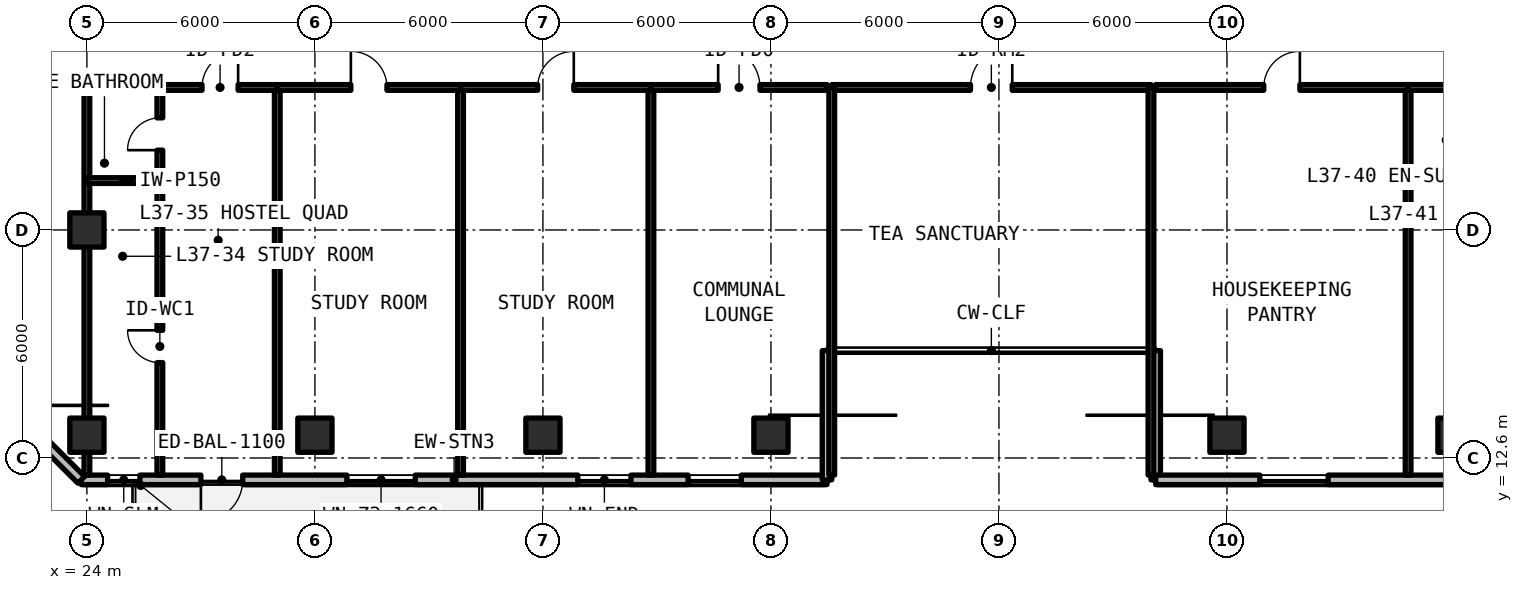
"""IFC4 building model, lengths in metres.
Left out: names, types, materials, properties, quantities, classifications, styles, units other than length and angle.
Written with IfcOpenShell. Run it as: python <this file> out.ifc"""

import sys

from ifc_helpers import new_model, si_unit, direction, frame, frame_2d, origin, origin_2d, place, context, subcontext, project, spatial, rectangle, extrude, element, fill, save


model = new_model("IFC4")
c1 = context("Model", 3, precision=1e-05, world=origin(), true_north=direction((0.0, 1.0)))
c2 = subcontext(c1, "Body", "Model", "MODEL_VIEW")
j1 = project(units=[si_unit("LENGTHUNIT", "METRE"), si_unit("PLANEANGLEUNIT", "RADIAN")], contexts=[c1])
p1 = place(None, origin())
s1 = spatial("IfcSite", under=j1, at=p1, CompositionType="ELEMENT")
p2 = place(p1, origin())
s2 = spatial("IfcBuilding", under=s1, at=p2, CompositionType="ELEMENT")
p3 = place(p2, frame((0.0, 0.0, 135.3)))
s3 = spatial("IfcBuildingStorey", under=s2, at=p3, CompositionType="ELEMENT", Elevation=135.3)
for number, where, z_axis, x_axis in (
    (1, (24.0, 18.6, 0.0), (0.0, 0.0, 1.0), (1.0, 0.0, 0.0)),
    (2, (24.0, 13.2, 0.0), (0.0, 0.0, 1.0), (1.0, 0.0, 0.0)),
    (3, (30.0, 13.2, 0.0), (0.0, 0.0, 1.0), (1.0, 0.0, 0.0)),
    (4, (36.0, 13.2, 0.0), (0.0, 0.0, 1.0), (1.0, 0.0, 0.0)),
    (5, (42.0, 13.2, 0.0), (0.0, 0.0, 1.0), (1.0, 0.0, 0.0)),
    (6, (54.0, 13.2, 0.0), (0.0, 0.0, 1.0), (1.0, 0.0, 0.0)),
    (7, (60.0, 13.2, 0.0), (0.0, 0.0, 1.0), (1.0, 0.0, 0.0)),
):
    element("IfcColumn", number, at=place(p3, frame(where, z_axis=z_axis, x_axis=x_axis)), inside=s3, PredefinedType="COLUMN", context=c2, shape_type="SweptSolid", body=[
        extrude(rectangle(XDim=0.9, YDim=0.9, at=origin_2d()), origin(), (0.0, 0.0, 1.0), 3.3),
    ])
p4 = place(p3, frame((23.852, 12.025, 0.0), z_axis=(0.0, 0.0, 1.0), x_axis=(1.0, 0.0, 0.0)))
e8 = element("IfcWall", 8, at=p4, inside=s3, PredefinedType="SOLIDWALL", context=c2, shape_type="SweptSolid", body=[
    extrude(rectangle(XDim=19.623, YDim=0.25, at=frame_2d((9.812, 0.0))), origin(), (0.0, 0.0, 1.0), 3.08),
])
p5 = place(p4, frame((3.148, 0.0, 0.0)))
e9 = element("IfcOpeningElement", 9, at=p5, cuts=e8, PredefinedType="OPENING", context=c2, shape_type="SweptSolid", body=[
    extrude(rectangle(XDim=1.1, YDim=2.15, at=frame_2d((0.55, 1.075))), frame((0.0, 0.135, 0.0), z_axis=(0.0, -1.0, 0.0), x_axis=(1.0, 0.0, 0.0)), (0.0, 0.0, 1.0), 0.27),
])
p6 = place(p4, frame((0.693, 0.0, 0.78)))
e10 = element("IfcOpeningElement", 10, at=p6, cuts=e8, PredefinedType="OPENING", context=c2, shape_type="SweptSolid", body=[
    extrude(rectangle(XDim=0.85, YDim=1.65, at=frame_2d((0.425, 0.825))), frame((0.0, 0.135, 0.0), z_axis=(0.0, -1.0, 0.0), x_axis=(1.0, 0.0, 0.0)), (0.0, 0.0, 1.0), 0.27),
])
p7 = place(p4, frame((6.989, 0.0, 0.78)))
e11 = element("IfcOpeningElement", 11, at=p7, cuts=e8, PredefinedType="OPENING", context=c2, shape_type="SweptSolid", body=[
    extrude(rectangle(XDim=1.8, YDim=1.66, at=frame_2d((0.9, 0.83))), frame((0.0, 0.135, 0.0), z_axis=(0.0, -1.0, 0.0), x_axis=(1.0, 0.0, 0.0)), (0.0, 0.0, 1.0), 0.27),
])
p8 = place(p4, frame((13.065, 0.0, 0.78)))
e12 = element("IfcOpeningElement", 12, at=p8, cuts=e8, PredefinedType="OPENING", context=c2, shape_type="SweptSolid", body=[
    extrude(rectangle(XDim=1.4, YDim=1.65, at=frame_2d((0.7, 0.825))), frame((0.0, 0.135, 0.0), z_axis=(0.0, -1.0, 0.0), x_axis=(1.0, 0.0, 0.0)), (0.0, 0.0, 1.0), 0.27),
])
p9 = place(p4, frame((15.969, 0.0, 0.78)))
e13 = element("IfcOpeningElement", 13, at=p9, cuts=e8, PredefinedType="OPENING", context=c2, shape_type="SweptSolid", body=[
    extrude(rectangle(XDim=1.4, YDim=1.65, at=frame_2d((0.7, 0.825))), frame((0.0, 0.135, 0.0), z_axis=(0.0, -1.0, 0.0), x_axis=(1.0, 0.0, 0.0)), (0.0, 0.0, 1.0), 0.27),
])
for number, where, z_axis, x_axis in (
    (14, (43.475, 12.025, 0.0), (0.0, 0.0, 1.0), (0.0, 1.0, 0.0)),
    (15, (52.125, 15.425, 0.0), (0.0, 0.0, 1.0), (0.0, -1.0, 0.0)),
):
    element("IfcWall", number, at=place(p3, frame(where, z_axis=z_axis, x_axis=x_axis)), inside=s3, PredefinedType="SOLIDWALL", context=c2, shape_type="SweptSolid", body=[
        extrude(rectangle(XDim=3.4, YDim=0.25, at=frame_2d((1.7, 0.0))), origin(), (0.0, 0.0, 1.0), 3.08),
    ])
p10 = place(p3, frame((52.125, 12.025, 0.0), z_axis=(0.0, 0.0, 1.0), x_axis=(1.0, 0.0, 0.0)))
e16 = element("IfcWall", 16, at=p10, inside=s3, PredefinedType="SOLIDWALL", context=c2, shape_type="SweptSolid", body=[
    extrude(rectangle(XDim=43.623, YDim=0.25, at=frame_2d((21.812, 0.0))), origin(), (0.0, 0.0, 1.0), 3.08),
])
p11 = place(p10, frame((10.925, 0.0, 0.0)))
e17 = element("IfcOpeningElement", 17, at=p11, cuts=e16, PredefinedType="OPENING", context=c2, shape_type="SweptSolid", body=[
    extrude(rectangle(XDim=1.1, YDim=2.15, at=frame_2d((0.55, 1.075))), frame((0.0, 0.135, 0.0), z_axis=(0.0, -1.0, 0.0), x_axis=(1.0, 0.0, 0.0)), (0.0, 0.0, 1.0), 0.27),
])
p12 = place(p10, frame((22.025, 0.0, 0.0)))
e18 = element("IfcOpeningElement", 18, at=p12, cuts=e16, PredefinedType="OPENING", context=c2, shape_type="SweptSolid", body=[
    extrude(rectangle(XDim=1.1, YDim=2.15, at=frame_2d((0.55, 1.075))), frame((0.0, 0.135, 0.0), z_axis=(0.0, -1.0, 0.0), x_axis=(1.0, 0.0, 0.0)), (0.0, 0.0, 1.0), 0.27),
])
p13 = place(p10, frame((2.738, 0.0, 0.78)))
e19 = element("IfcOpeningElement", 19, at=p13, cuts=e16, PredefinedType="OPENING", context=c2, shape_type="SweptSolid", body=[
    extrude(rectangle(XDim=1.8, YDim=1.66, at=frame_2d((0.9, 0.83))), frame((0.0, 0.135, 0.0), z_axis=(0.0, -1.0, 0.0), x_axis=(1.0, 0.0, 0.0)), (0.0, 0.0, 1.0), 0.27),
])
p14 = place(p10, frame((8.443, 0.0, 0.78)))
e20 = element("IfcOpeningElement", 20, at=p14, cuts=e16, PredefinedType="OPENING", context=c2, shape_type="SweptSolid", body=[
    extrude(rectangle(XDim=0.85, YDim=1.65, at=frame_2d((0.425, 0.825))), frame((0.0, 0.135, 0.0), z_axis=(0.0, -1.0, 0.0), x_axis=(1.0, 0.0, 0.0)), (0.0, 0.0, 1.0), 0.27),
])
p15 = place(p10, frame((14.879, 0.0, 0.78)))
e21 = element("IfcOpeningElement", 21, at=p15, cuts=e16, PredefinedType="OPENING", context=c2, shape_type="SweptSolid", body=[
    extrude(rectangle(XDim=0.85, YDim=1.65, at=frame_2d((0.425, 0.825))), frame((0.0, 0.135, 0.0), z_axis=(0.0, -1.0, 0.0), x_axis=(1.0, 0.0, 0.0)), (0.0, 0.0, 1.0), 0.27),
])
p16 = place(p10, frame((17.184, 0.0, 0.78)))
e22 = element("IfcOpeningElement", 22, at=p16, cuts=e16, PredefinedType="OPENING", context=c2, shape_type="SweptSolid", body=[
    extrude(rectangle(XDim=1.8, YDim=1.66, at=frame_2d((0.9, 0.83))), frame((0.0, 0.135, 0.0), z_axis=(0.0, -1.0, 0.0), x_axis=(1.0, 0.0, 0.0)), (0.0, 0.0, 1.0), 0.27),
])
p17 = place(p10, frame((26.643, 0.0, 0.78)))
e23 = element("IfcOpeningElement", 23, at=p17, cuts=e16, PredefinedType="OPENING", context=c2, shape_type="SweptSolid", body=[
    extrude(rectangle(XDim=1.4, YDim=1.65, at=frame_2d((0.7, 0.825))), frame((0.0, 0.135, 0.0), z_axis=(0.0, -1.0, 0.0), x_axis=(1.0, 0.0, 0.0)), (0.0, 0.0, 1.0), 0.27),
])
p18 = place(p10, frame((32.777, 0.0, 0.78)))
e24 = element("IfcOpeningElement", 24, at=p18, cuts=e16, PredefinedType="OPENING", context=c2, shape_type="SweptSolid", body=[
    extrude(rectangle(XDim=1.8, YDim=1.66, at=frame_2d((0.9, 0.83))), frame((0.0, 0.135, 0.0), z_axis=(0.0, -1.0, 0.0), x_axis=(1.0, 0.0, 0.0)), (0.0, 0.0, 1.0), 0.27),
])
p19 = place(p10, frame((38.836, 0.0, 0.78)))
e25 = element("IfcOpeningElement", 25, at=p19, cuts=e16, PredefinedType="OPENING", context=c2, shape_type="SweptSolid", body=[
    extrude(rectangle(XDim=1.8, YDim=1.66, at=frame_2d((0.9, 0.83))), frame((0.0, 0.135, 0.0), z_axis=(0.0, -1.0, 0.0), x_axis=(1.0, 0.0, 0.0)), (0.0, 0.0, 1.0), 0.27),
])
p20 = place(p3, frame((19.725, 16.152, 0.0), z_axis=(0.0, 0.0, 1.0), x_axis=(0.70708586489, -0.707127696864, 0.0)))
e26 = element("IfcWall", 26, at=p20, inside=s3, PredefinedType="SOLIDWALL", context=c2, shape_type="SweptSolid", body=[
    extrude(rectangle(XDim=5.836, YDim=0.25, at=frame_2d((2.918, 0.0))), origin(), (0.0, 0.0, 1.0), 3.08),
])
p21 = place(p20, frame((0.898, 0.0, 0.78)))
e27 = element("IfcOpeningElement", 27, at=p21, cuts=e26, PredefinedType="OPENING", context=c2, shape_type="SweptSolid", body=[
    extrude(rectangle(XDim=3.4, YDim=1.66, at=frame_2d((1.7, 0.83))), frame((0.0, 0.135, 0.0), z_axis=(0.0, -1.0, 0.0), x_axis=(1.0, 0.0, 0.0)), (0.0, 0.0, 1.0), 0.27),
])
p22 = place(p3, frame((43.6, 22.35, 0.0), z_axis=(0.0, 0.0, 1.0), x_axis=(1.0, 0.0, 0.0)))
e28 = element("IfcWall", 28, at=p22, inside=s3, PredefinedType="SOLIDWALL", context=c2, shape_type="SweptSolid", body=[
    extrude(rectangle(XDim=8.4, YDim=0.15, at=frame_2d((4.2, 0.0))), origin(), (0.0, 0.0, 1.0), 2.35),
])
p23 = place(p22, frame((3.65, 0.0, 0.0)))
e29 = element("IfcOpeningElement", 29, at=p23, cuts=e28, PredefinedType="OPENING", context=c2, shape_type="SweptSolid", body=[
    extrude(rectangle(XDim=1.1, YDim=2.15, at=frame_2d((0.55, 1.075))), frame((0.0, 0.085, 0.0), z_axis=(0.0, -1.0, 0.0), x_axis=(1.0, 0.0, 0.0)), (0.0, 0.0, 1.0), 0.17),
])
for number, where, z_axis, x_axis in (
    (30, (43.6, 12.15, 0.0), (0.0, 0.0, 1.0), (0.0, 1.0, 0.0)),
    (31, (52.0, 12.15, 0.0), (0.0, 0.0, 1.0), (0.0, 1.0, 0.0)),
    (32, (24.0, 12.15, 0.0), (0.0, 0.0, 1.0), (0.0, 1.0, 0.0)),
    (33, (29.009, 12.15, 0.0), (0.0, 0.0, 1.0), (0.0, 1.0, 0.0)),
):
    element("IfcWall", number, at=place(p3, frame(where, z_axis=z_axis, x_axis=x_axis)), inside=s3, PredefinedType="SOLIDWALL", context=c2, shape_type="SweptSolid", body=[
        extrude(rectangle(XDim=10.2, YDim=0.15, at=frame_2d((5.1, 0.0))), origin(), (0.0, 0.0, 1.0), 2.35),
    ])
p24 = place(p3, frame((24.0, 19.9, 0.0), z_axis=(0.0, 0.0, 1.0), x_axis=(1.0, 0.0, 0.0)))
e34 = element("IfcWall", 34, at=p24, inside=s3, PredefinedType="PARTITIONING", context=c2, shape_type="SweptSolid", body=[
    extrude(rectangle(XDim=1.92, YDim=0.15, at=frame_2d((0.96, 0.0))), origin(), (0.0, 0.0, 1.0), 2.35),
])
p25 = place(p3, frame((25.92, 12.15, 0.0), z_axis=(0.0, 0.0, 1.0), x_axis=(0.0, 1.0, 0.0)))
e35 = element("IfcWall", 35, at=p25, inside=s3, PredefinedType="PARTITIONING", context=c2, shape_type="SweptSolid", body=[
    extrude(rectangle(XDim=10.2, YDim=0.15, at=frame_2d((5.1, 0.0))), origin(), (0.0, 0.0, 1.0), 2.35),
])
p26 = place(p25, frame((2.96, 0.0, 0.0)))
e36 = element("IfcOpeningElement", 36, at=p26, cuts=e35, PredefinedType="OPENING", context=c2, shape_type="SweptSolid", body=[
    extrude(rectangle(XDim=0.85, YDim=2.1, at=frame_2d((0.425, 1.05))), frame((0.0, 0.085, 0.0), z_axis=(0.0, -1.0, 0.0), x_axis=(1.0, 0.0, 0.0)), (0.0, 0.0, 1.0), 0.17),
])
p27 = place(p25, frame((8.55, 0.0, 0.0)))
e37 = element("IfcOpeningElement", 37, at=p27, cuts=e35, PredefinedType="OPENING", context=c2, shape_type="SweptSolid", body=[
    extrude(rectangle(XDim=0.85, YDim=2.1, at=frame_2d((0.425, 1.05))), frame((0.0, 0.085, 0.0), z_axis=(0.0, -1.0, 0.0), x_axis=(1.0, 0.0, 0.0)), (0.0, 0.0, 1.0), 0.17),
])
p28 = place(p3, frame((24.0, 22.35, 0.0), z_axis=(0.0, 0.0, 1.0), x_axis=(1.0, 0.0, 0.0)))
e38 = element("IfcWall", 38, at=p28, inside=s3, PredefinedType="SOLIDWALL", context=c2, shape_type="SweptSolid", body=[
    extrude(rectangle(XDim=5.009, YDim=0.15, at=frame_2d((2.504, 0.0))), origin(), (0.0, 0.0, 1.0), 2.35),
])
p29 = place(p28, frame((3.03, 0.0, 0.0)))
e39 = element("IfcOpeningElement", 39, at=p29, cuts=e38, PredefinedType="OPENING", context=c2, shape_type="SweptSolid", body=[
    extrude(rectangle(XDim=0.95, YDim=2.15, at=frame_2d((0.475, 1.075))), frame((0.0, 0.085, 0.0), z_axis=(0.0, -1.0, 0.0), x_axis=(1.0, 0.0, 0.0)), (0.0, 0.0, 1.0), 0.17),
])
p30 = place(p3, frame((33.833, 12.15, 0.0), z_axis=(0.0, 0.0, 1.0), x_axis=(0.0, 1.0, 0.0)))
e40 = element("IfcWall", 40, at=p30, inside=s3, PredefinedType="SOLIDWALL", context=c2, shape_type="SweptSolid", body=[
    extrude(rectangle(XDim=10.2, YDim=0.15, at=frame_2d((5.1, 0.0))), origin(), (0.0, 0.0, 1.0), 2.35),
])
p31 = place(p3, frame((29.009, 22.35, 0.0), z_axis=(0.0, 0.0, 1.0), x_axis=(1.0, 0.0, 0.0)))
e41 = element("IfcWall", 41, at=p31, inside=s3, PredefinedType="SOLIDWALL", context=c2, shape_type="SweptSolid", body=[
    extrude(rectangle(XDim=4.824, YDim=0.15, at=frame_2d((2.412, 0.0))), origin(), (0.0, 0.0, 1.0), 2.35),
])
p32 = place(p31, frame((1.937, 0.0, 0.0)))
e42 = element("IfcOpeningElement", 42, at=p32, cuts=e41, PredefinedType="OPENING", context=c2, shape_type="SweptSolid", body=[
    extrude(rectangle(XDim=0.95, YDim=2.15, at=frame_2d((0.475, 1.075))), frame((0.0, 0.085, 0.0), z_axis=(0.0, -1.0, 0.0), x_axis=(1.0, 0.0, 0.0)), (0.0, 0.0, 1.0), 0.17),
])
p33 = place(p3, frame((38.842, 12.15, 0.0), z_axis=(0.0, 0.0, 1.0), x_axis=(0.0, 1.0, 0.0)))
e43 = element("IfcWall", 43, at=p33, inside=s3, PredefinedType="SOLIDWALL", context=c2, shape_type="SweptSolid", body=[
    extrude(rectangle(XDim=10.2, YDim=0.15, at=frame_2d((5.1, 0.0))), origin(), (0.0, 0.0, 1.0), 2.35),
])
p34 = place(p3, frame((33.833, 22.35, 0.0), z_axis=(0.0, 0.0, 1.0), x_axis=(1.0, 0.0, 0.0)))
e44 = element("IfcWall", 44, at=p34, inside=s3, PredefinedType="SOLIDWALL", context=c2, shape_type="SweptSolid", body=[
    extrude(rectangle(XDim=5.009, YDim=0.15, at=frame_2d((2.504, 0.0))), origin(), (0.0, 0.0, 1.0), 2.35),
])
p35 = place(p34, frame((2.03, 0.0, 0.0)))
e45 = element("IfcOpeningElement", 45, at=p35, cuts=e44, PredefinedType="OPENING", context=c2, shape_type="SweptSolid", body=[
    extrude(rectangle(XDim=0.95, YDim=2.15, at=frame_2d((0.475, 1.075))), frame((0.0, 0.085, 0.0), z_axis=(0.0, -1.0, 0.0), x_axis=(1.0, 0.0, 0.0)), (0.0, 0.0, 1.0), 0.17),
])
p36 = place(p3, frame((38.842, 22.35, 0.0), z_axis=(0.0, 0.0, 1.0), x_axis=(1.0, 0.0, 0.0)))
e46 = element("IfcWall", 46, at=p36, inside=s3, PredefinedType="SOLIDWALL", context=c2, shape_type="SweptSolid", body=[
    extrude(rectangle(XDim=4.638, YDim=0.15, at=frame_2d((2.319, 0.0))), origin(), (0.0, 0.0, 1.0), 2.35),
])
p37 = place(p36, frame((1.769, 0.0, 0.0)))
e47 = element("IfcOpeningElement", 47, at=p37, cuts=e46, PredefinedType="OPENING", context=c2, shape_type="SweptSolid", body=[
    extrude(rectangle(XDim=1.1, YDim=2.15, at=frame_2d((0.55, 1.075))), frame((0.0, 0.085, 0.0), z_axis=(0.0, -1.0, 0.0), x_axis=(1.0, 0.0, 0.0)), (0.0, 0.0, 1.0), 0.17),
])
p38 = place(p3, frame((58.767, 12.15, 0.0), z_axis=(0.0, 0.0, 1.0), x_axis=(0.0, 1.0, 0.0)))
e48 = element("IfcWall", 48, at=p38, inside=s3, PredefinedType="SOLIDWALL", context=c2, shape_type="SweptSolid", body=[
    extrude(rectangle(XDim=10.2, YDim=0.15, at=frame_2d((5.1, 0.0))), origin(), (0.0, 0.0, 1.0), 2.35),
])
p39 = place(p3, frame((52.12, 22.35, 0.0), z_axis=(0.0, 0.0, 1.0), x_axis=(1.0, 0.0, 0.0)))
e49 = element("IfcWall", 49, at=p39, inside=s3, PredefinedType="SOLIDWALL", context=c2, shape_type="SweptSolid", body=[
    extrude(rectangle(XDim=6.646, YDim=0.15, at=frame_2d((3.323, 0.0))), origin(), (0.0, 0.0, 1.0), 2.35),
])
p40 = place(p39, frame((2.848, 0.0, 0.0)))
e50 = element("IfcOpeningElement", 50, at=p40, cuts=e49, PredefinedType="OPENING", context=c2, shape_type="SweptSolid", body=[
    extrude(rectangle(XDim=0.95, YDim=2.15, at=frame_2d((0.475, 1.075))), frame((0.0, 0.085, 0.0), z_axis=(0.0, -1.0, 0.0), x_axis=(1.0, 0.0, 0.0)), (0.0, 0.0, 1.0), 0.17),
])
p41 = place(p3, frame((58.767, 19.9, 0.0), z_axis=(0.0, 0.0, 1.0), x_axis=(1.0, 0.0, 0.0)))
e51 = element("IfcWall", 51, at=p41, inside=s3, PredefinedType="PARTITIONING", context=c2, shape_type="SweptSolid", body=[
    extrude(rectangle(XDim=3.153, YDim=0.15, at=frame_2d((1.577, 0.0))), origin(), (0.0, 0.0, 1.0), 2.35),
])
p42 = place(p3, frame((58.767, 22.35, 0.0), z_axis=(0.0, 0.0, 1.0), x_axis=(1.0, 0.0, 0.0)))
e52 = element("IfcWall", 52, at=p42, inside=s3, PredefinedType="SOLIDWALL", context=c2, shape_type="SweptSolid", body=[
    extrude(rectangle(XDim=7.478, YDim=0.15, at=frame_2d((3.739, 0.0))), origin(), (0.0, 0.0, 1.0), 2.35),
])
p43 = place(p42, frame((4.881, 0.0, 0.0)))
e53 = element("IfcOpeningElement", 53, at=p43, cuts=e52, PredefinedType="OPENING", context=c2, shape_type="SweptSolid", body=[
    extrude(rectangle(XDim=0.95, YDim=2.15, at=frame_2d((0.475, 1.075))), frame((0.0, 0.085, 0.0), z_axis=(0.0, -1.0, 0.0), x_axis=(1.0, 0.0, 0.0)), (0.0, 0.0, 1.0), 0.17),
])
p44 = place(p5, frame((1.1, 0.0, 0.0), z_axis=(0.0, 0.0, 1.0), x_axis=(-1.0, 0.0, 0.0)))
e54 = element("IfcDoor", 54, at=p44, inside=s3, OperationType="SINGLE_SWING_RIGHT", PredefinedType="DOOR", context=c2, shape_type="SweptSolid", body=[
    extrude(rectangle(XDim=1.1, YDim=2.15, at=frame_2d((0.55, 1.075))), frame((0.0, 0.025, 0.0), z_axis=(0.0, -1.0, 0.0), x_axis=(1.0, 0.0, 0.0)), (0.0, 0.0, 1.0), 0.05),
])
fill(e9, e54)
p45 = place(p6, origin())
e55 = element("IfcWindow", 55, at=p45, inside=s3, PartitioningType="SINGLE_PANEL", PredefinedType="WINDOW", context=c2, shape_type="SweptSolid", body=[
    extrude(rectangle(XDim=0.85, YDim=1.65, at=frame_2d((0.425, 0.825))), frame((0.0, 0.03, 0.0), z_axis=(0.0, -1.0, 0.0), x_axis=(1.0, 0.0, 0.0)), (0.0, 0.0, 1.0), 0.06),
])
fill(e10, e55)
p46 = place(p7, origin())
e56 = element("IfcWindow", 56, at=p46, inside=s3, PartitioningType="SINGLE_PANEL", PredefinedType="WINDOW", context=c2, shape_type="SweptSolid", body=[
    extrude(rectangle(XDim=1.8, YDim=1.66, at=frame_2d((0.9, 0.83))), frame((0.0, 0.03, 0.0), z_axis=(0.0, -1.0, 0.0), x_axis=(1.0, 0.0, 0.0)), (0.0, 0.0, 1.0), 0.06),
])
fill(e11, e56)
p47 = place(p8, origin())
e57 = element("IfcWindow", 57, at=p47, inside=s3, PartitioningType="SINGLE_PANEL", PredefinedType="WINDOW", context=c2, shape_type="SweptSolid", body=[
    extrude(rectangle(XDim=1.4, YDim=1.65, at=frame_2d((0.7, 0.825))), frame((0.0, 0.03, 0.0), z_axis=(0.0, -1.0, 0.0), x_axis=(1.0, 0.0, 0.0)), (0.0, 0.0, 1.0), 0.06),
])
fill(e12, e57)
p48 = place(p9, origin())
e58 = element("IfcWindow", 58, at=p48, inside=s3, PartitioningType="SINGLE_PANEL", PredefinedType="WINDOW", context=c2, shape_type="SweptSolid", body=[
    extrude(rectangle(XDim=1.4, YDim=1.65, at=frame_2d((0.7, 0.825))), frame((0.0, 0.03, 0.0), z_axis=(0.0, -1.0, 0.0), x_axis=(1.0, 0.0, 0.0)), (0.0, 0.0, 1.0), 0.06),
])
fill(e13, e58)
p49 = place(p13, origin())
e59 = element("IfcWindow", 59, at=p49, inside=s3, PartitioningType="SINGLE_PANEL", PredefinedType="WINDOW", context=c2, shape_type="SweptSolid", body=[
    extrude(rectangle(XDim=1.8, YDim=1.66, at=frame_2d((0.9, 0.83))), frame((0.0, 0.03, 0.0), z_axis=(0.0, -1.0, 0.0), x_axis=(1.0, 0.0, 0.0)), (0.0, 0.0, 1.0), 0.06),
])
fill(e19, e59)
p50 = place(p23, origin())
e60 = element("IfcDoor", 60, at=p50, inside=s3, OperationType="SINGLE_SWING_RIGHT", PredefinedType="DOOR", context=c2, shape_type="SweptSolid", body=[
    extrude(rectangle(XDim=1.1, YDim=2.15, at=frame_2d((0.55, 1.075))), frame((0.0, 0.025, 0.0), z_axis=(0.0, -1.0, 0.0), x_axis=(1.0, 0.0, 0.0)), (0.0, 0.0, 1.0), 0.05),
])
fill(e29, e60)
p51 = place(p26, origin())
e61 = element("IfcDoor", 61, at=p51, inside=s3, OperationType="SINGLE_SWING_RIGHT", PredefinedType="DOOR", context=c2, shape_type="SweptSolid", body=[
    extrude(rectangle(XDim=0.85, YDim=2.1, at=frame_2d((0.425, 1.05))), frame((0.0, 0.025, 0.0), z_axis=(0.0, -1.0, 0.0), x_axis=(1.0, 0.0, 0.0)), (0.0, 0.0, 1.0), 0.05),
])
fill(e36, e61)
p52 = place(p27, origin())
e62 = element("IfcDoor", 62, at=p52, inside=s3, OperationType="SINGLE_SWING_LEFT", PredefinedType="DOOR", context=c2, shape_type="SweptSolid", body=[
    extrude(rectangle(XDim=0.85, YDim=2.1, at=frame_2d((0.425, 1.05))), frame((0.0, 0.025, 0.0), z_axis=(0.0, -1.0, 0.0), x_axis=(1.0, 0.0, 0.0)), (0.0, 0.0, 1.0), 0.05),
])
fill(e37, e62)
p53 = place(p29, origin())
e63 = element("IfcDoor", 63, at=p53, inside=s3, OperationType="SINGLE_SWING_RIGHT", PredefinedType="DOOR", context=c2, shape_type="SweptSolid", body=[
    extrude(rectangle(XDim=0.95, YDim=2.15, at=frame_2d((0.475, 1.075))), frame((0.0, 0.025, 0.0), z_axis=(0.0, -1.0, 0.0), x_axis=(1.0, 0.0, 0.0)), (0.0, 0.0, 1.0), 0.05),
])
fill(e39, e63)
p54 = place(p32, origin())
e64 = element("IfcDoor", 64, at=p54, inside=s3, OperationType="SINGLE_SWING_LEFT", PredefinedType="DOOR", context=c2, shape_type="SweptSolid", body=[
    extrude(rectangle(XDim=0.95, YDim=2.15, at=frame_2d((0.475, 1.075))), frame((0.0, 0.025, 0.0), z_axis=(0.0, -1.0, 0.0), x_axis=(1.0, 0.0, 0.0)), (0.0, 0.0, 1.0), 0.05),
])
fill(e42, e64)
p55 = place(p35, origin())
e65 = element("IfcDoor", 65, at=p55, inside=s3, OperationType="SINGLE_SWING_RIGHT", PredefinedType="DOOR", context=c2, shape_type="SweptSolid", body=[
    extrude(rectangle(XDim=0.95, YDim=2.15, at=frame_2d((0.475, 1.075))), frame((0.0, 0.025, 0.0), z_axis=(0.0, -1.0, 0.0), x_axis=(1.0, 0.0, 0.0)), (0.0, 0.0, 1.0), 0.05),
])
fill(e45, e65)
p56 = place(p37, origin())
e66 = element("IfcDoor", 66, at=p56, inside=s3, OperationType="SINGLE_SWING_LEFT", PredefinedType="DOOR", context=c2, shape_type="SweptSolid", body=[
    extrude(rectangle(XDim=1.1, YDim=2.15, at=frame_2d((0.55, 1.075))), frame((0.0, 0.025, 0.0), z_axis=(0.0, -1.0, 0.0), x_axis=(1.0, 0.0, 0.0)), (0.0, 0.0, 1.0), 0.05),
])
fill(e47, e66)
p57 = place(p40, origin())
e67 = element("IfcDoor", 67, at=p57, inside=s3, OperationType="SINGLE_SWING_RIGHT", PredefinedType="DOOR", context=c2, shape_type="SweptSolid", body=[
    extrude(rectangle(XDim=0.95, YDim=2.15, at=frame_2d((0.475, 1.075))), frame((0.0, 0.025, 0.0), z_axis=(0.0, -1.0, 0.0), x_axis=(1.0, 0.0, 0.0)), (0.0, 0.0, 1.0), 0.05),
])
fill(e50, e67)
save(model, sys.argv[1])
